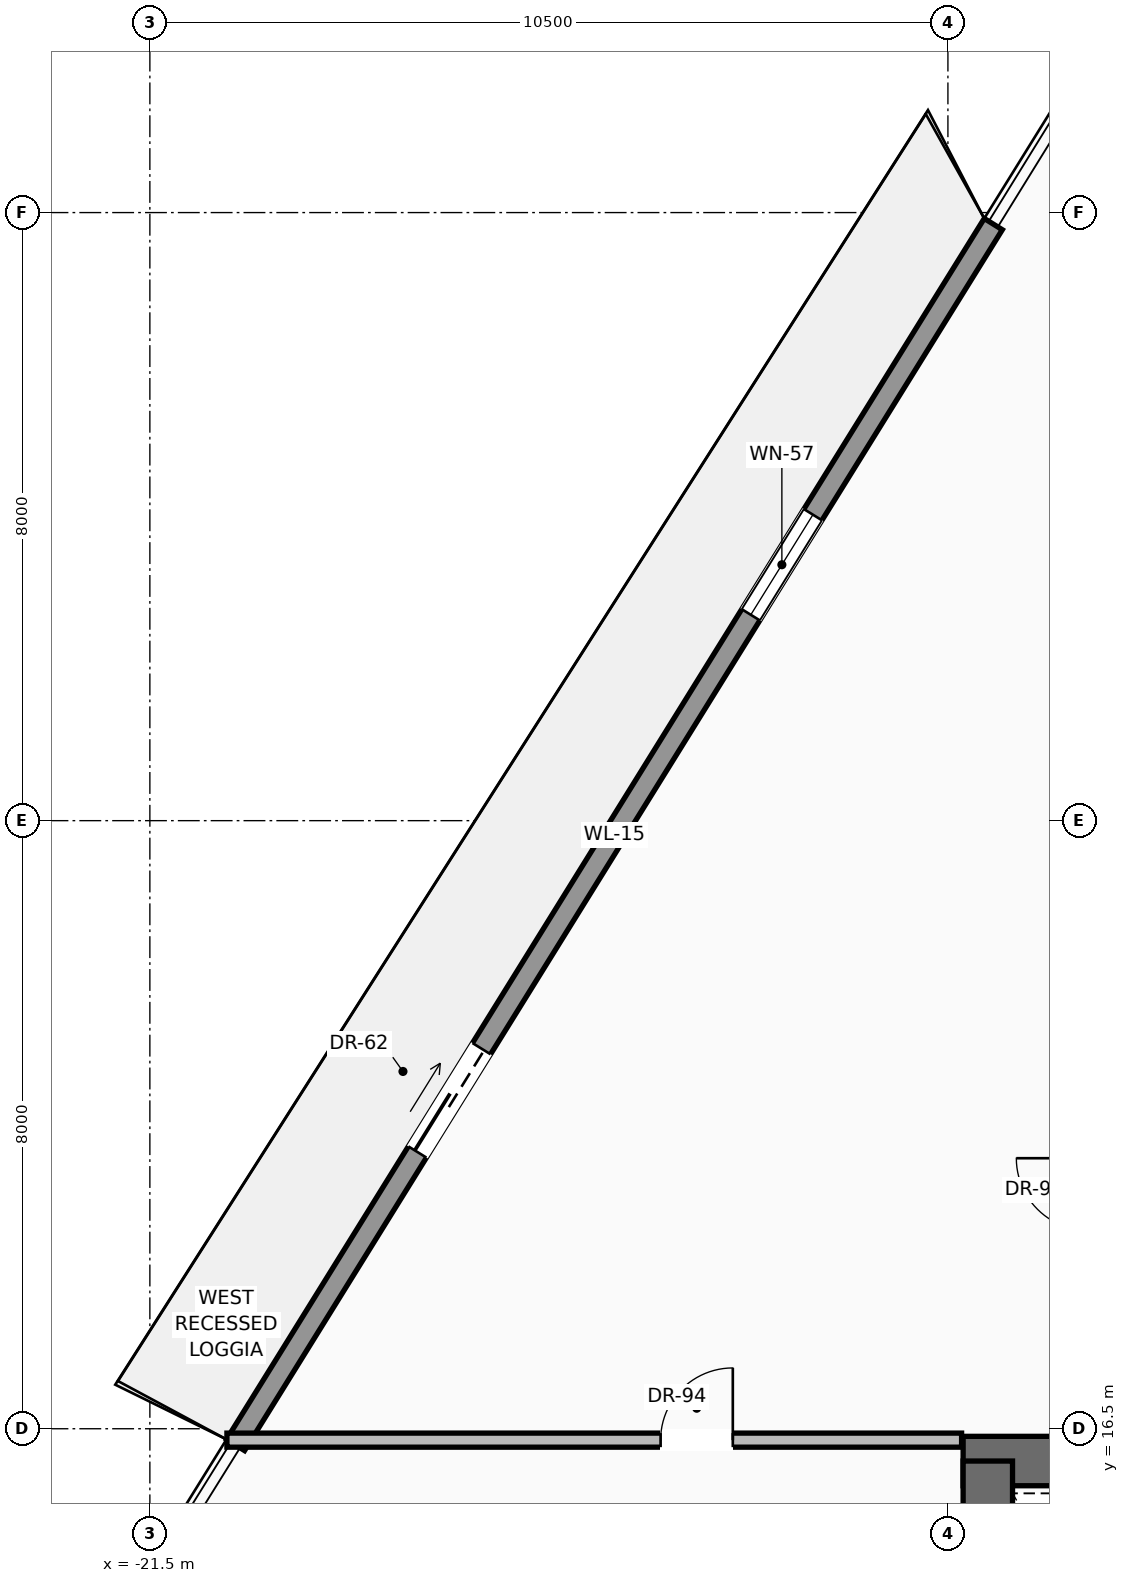
"""IFC4 building model, lengths in metres.
Left out: names, types, materials, properties, quantities, classifications, styles, units other than length and angle.
Written with IfcOpenShell. Run it as: python <this file> out.ifc"""

import sys

from ifc_helpers import new_model, si_unit, direction, frame, frame_2d, origin, place, context, subcontext, project, spatial, rectangle, extrude, source, transform, mapped, element, fill, save


model = new_model("IFC4")
c1 = context("Model", 3, precision=1e-05, world=origin(), true_north=direction((0.0, 1.0)))
c2 = subcontext(c1, "Body", "Model", "MODEL_VIEW")
j1 = project(units=[si_unit("LENGTHUNIT", "METRE"), si_unit("PLANEANGLEUNIT", "RADIAN")], contexts=[c1])
p1 = place(None, origin())
s1 = spatial("IfcSite", under=j1, at=p1, CompositionType="ELEMENT")
p2 = place(p1, origin())
s2 = spatial("IfcBuilding", under=s1, at=p2, CompositionType="ELEMENT")
p3 = place(p2, frame((0.0, 0.0, 185.8)))
s3 = spatial("IfcBuildingStorey", under=s2, at=p3, CompositionType="ELEMENT", Elevation=185.8)
p4 = place(p3, frame((-10.8, 16.075, 0.0), z_axis=(0.0, 0.0, 1.0), x_axis=(1.0, 0.0, 0.0)))
e1 = element("IfcWall", 1, at=p4, inside=s3, PredefinedType="SHEAR", context=c2, shape_type="SweptSolid", body=[
    extrude(rectangle(XDim=21.6, YDim=0.65, at=frame_2d((10.8, 0.0))), origin(), (0.0, 0.0, 1.0), 3.47),
])
p5 = place(p4, frame((3.37, 0.0, 0.0)))
e2 = element("IfcOpeningElement", 2, at=p5, cuts=e1, PredefinedType="OPENING", context=c2, shape_type="SweptSolid", body=[
    extrude(rectangle(XDim=1.3, YDim=2.3, at=frame_2d((0.65, 1.15))), frame((0.0, 0.335, 0.0), z_axis=(0.0, -1.0, 0.0), x_axis=(1.0, 0.0, 0.0)), (0.0, 0.0, 1.0), 0.67),
])
p6 = place(p4, frame((9.8, 0.0, 0.0)))
e3 = element("IfcOpeningElement", 3, at=p6, cuts=e1, PredefinedType="OPENING", context=c2, shape_type="SweptSolid", body=[
    extrude(rectangle(XDim=2.0, YDim=2.4, at=frame_2d((1.0, 1.2))), frame((0.0, 0.335, 0.0), z_axis=(0.0, -1.0, 0.0), x_axis=(1.0, 0.0, 0.0)), (0.0, 0.0, 1.0), 0.67),
])
p7 = place(p3, frame((-10.475, 0.525, 0.0), z_axis=(0.0, 0.0, 1.0), x_axis=(0.0, 1.0, 0.0)))
e4 = element("IfcWall", 4, at=p7, inside=s3, PredefinedType="SHEAR", context=c2, shape_type="SweptSolid", body=[
    extrude(rectangle(XDim=15.55, YDim=0.65, at=frame_2d((7.775, 0.0))), origin(), (0.0, 0.0, 1.0), 3.47),
])
p8 = place(p3, frame((-20.373, 16.286, 0.0), z_axis=(0.0, 0.0, 1.0), x_axis=(0.527368326654, 0.849636774182, 0.0)))
e5 = element("IfcWall", 5, at=p8, inside=s3, PredefinedType="SOLIDWALL", context=c2, shape_type="SweptSolid", body=[
    extrude(rectangle(XDim=18.905, YDim=0.28, at=frame_2d((9.453, 0.0))), origin(), (0.0, 0.0, 1.0), 3.05),
])
p9 = place(p8, frame((4.537, 0.0, 0.0)))
e6 = element("IfcOpeningElement", 6, at=p9, cuts=e5, PredefinedType="OPENING", context=c2, shape_type="SweptSolid", body=[
    extrude(rectangle(XDim=1.6, YDim=2.35, at=frame_2d((0.8, 1.175))), frame((0.0, 0.15, 0.0), z_axis=(0.0, -1.0, 0.0), x_axis=(1.0, 0.0, 0.0)), (0.0, 0.0, 1.0), 0.3),
])
p10 = place(p8, frame((12.855, 0.0, 0.9)))
e7 = element("IfcOpeningElement", 7, at=p10, cuts=e5, PredefinedType="OPENING", context=c2, shape_type="SweptSolid", body=[
    extrude(rectangle(XDim=1.55, YDim=1.85, at=frame_2d((0.775, 0.925))), frame((0.0, 0.15, 0.0), z_axis=(0.0, -1.0, 0.0), x_axis=(1.0, 0.0, 0.0)), (0.0, 0.0, 1.0), 0.3),
])
p11 = place(p3, frame((-20.486, 16.35, 0.0), z_axis=(0.0, 0.0, 1.0), x_axis=(1.0, 0.0, 0.0)))
e8 = element("IfcWall", 8, at=p11, inside=s3, PredefinedType="PARTITIONING", context=c2, shape_type="SweptSolid", body=[
    extrude(rectangle(XDim=9.666, YDim=0.185, at=frame_2d((4.833, 0.0))), origin(), (0.0, 0.0, 1.0), 3.462),
])
p12 = place(p11, frame((5.706, 0.0, 0.0)))
e9 = element("IfcOpeningElement", 9, at=p12, cuts=e8, PredefinedType="OPENING", context=c2, shape_type="SweptSolid", body=[
    extrude(rectangle(XDim=0.95, YDim=2.2, at=frame_2d((0.475, 1.1))), frame((0.0, 0.103, 0.0), z_axis=(0.0, -1.0, 0.0), x_axis=(1.0, 0.0, 0.0)), (0.0, 0.0, 1.0), 0.205),
])
m1 = source(origin(), c2, "Body", "SweptSolid", [
    extrude(rectangle(XDim=1.6, YDim=2.35, at=frame_2d((0.8, 1.175))), frame((0.0, 0.025, 0.0), z_axis=(0.0, -1.0, 0.0), x_axis=(1.0, 0.0, 0.0)), (0.0, 0.0, 1.0), 0.05),
])
p13 = place(p9, origin())
e10 = element("IfcDoor", 10, at=p13, inside=s3, OperationType="SLIDING_TO_LEFT", PredefinedType="DOOR", context=c2, shape_type="MappedRepresentation", body=[
    mapped(m1, transform((0.0, 0.0, 0.0), scale=1.0)),
])
fill(e6, e10)
m2 = source(origin(), c2, "Body", "SweptSolid", [
    extrude(rectangle(XDim=1.55, YDim=1.85, at=frame_2d((0.775, 0.925))), frame((0.0, 0.03, 0.0), z_axis=(0.0, -1.0, 0.0), x_axis=(1.0, 0.0, 0.0)), (0.0, 0.0, 1.0), 0.06),
])
p14 = place(p10, origin())
e11 = element("IfcWindow", 11, at=p14, inside=s3, PartitioningType="SINGLE_PANEL", PredefinedType="WINDOW", context=c2, shape_type="MappedRepresentation", body=[
    mapped(m2, transform((0.0, 0.0, 0.0), scale=1.0)),
])
fill(e7, e11)
m3 = source(origin(), c2, "Body", "SweptSolid", [
    extrude(rectangle(XDim=0.95, YDim=2.2, at=frame_2d((0.475, 1.1))), frame((0.0, 0.025, 0.0), z_axis=(0.0, -1.0, 0.0), x_axis=(1.0, 0.0, 0.0)), (0.0, 0.0, 1.0), 0.05),
])
p15 = place(p12, origin())
e12 = element("IfcDoor", 12, at=p15, inside=s3, OperationType="SINGLE_SWING_RIGHT", PredefinedType="DOOR", context=c2, shape_type="MappedRepresentation", body=[
    mapped(m3, transform((0.0, 0.0, 0.0), scale=1.0)),
])
fill(e9, e12)
save(model, sys.argv[1])
